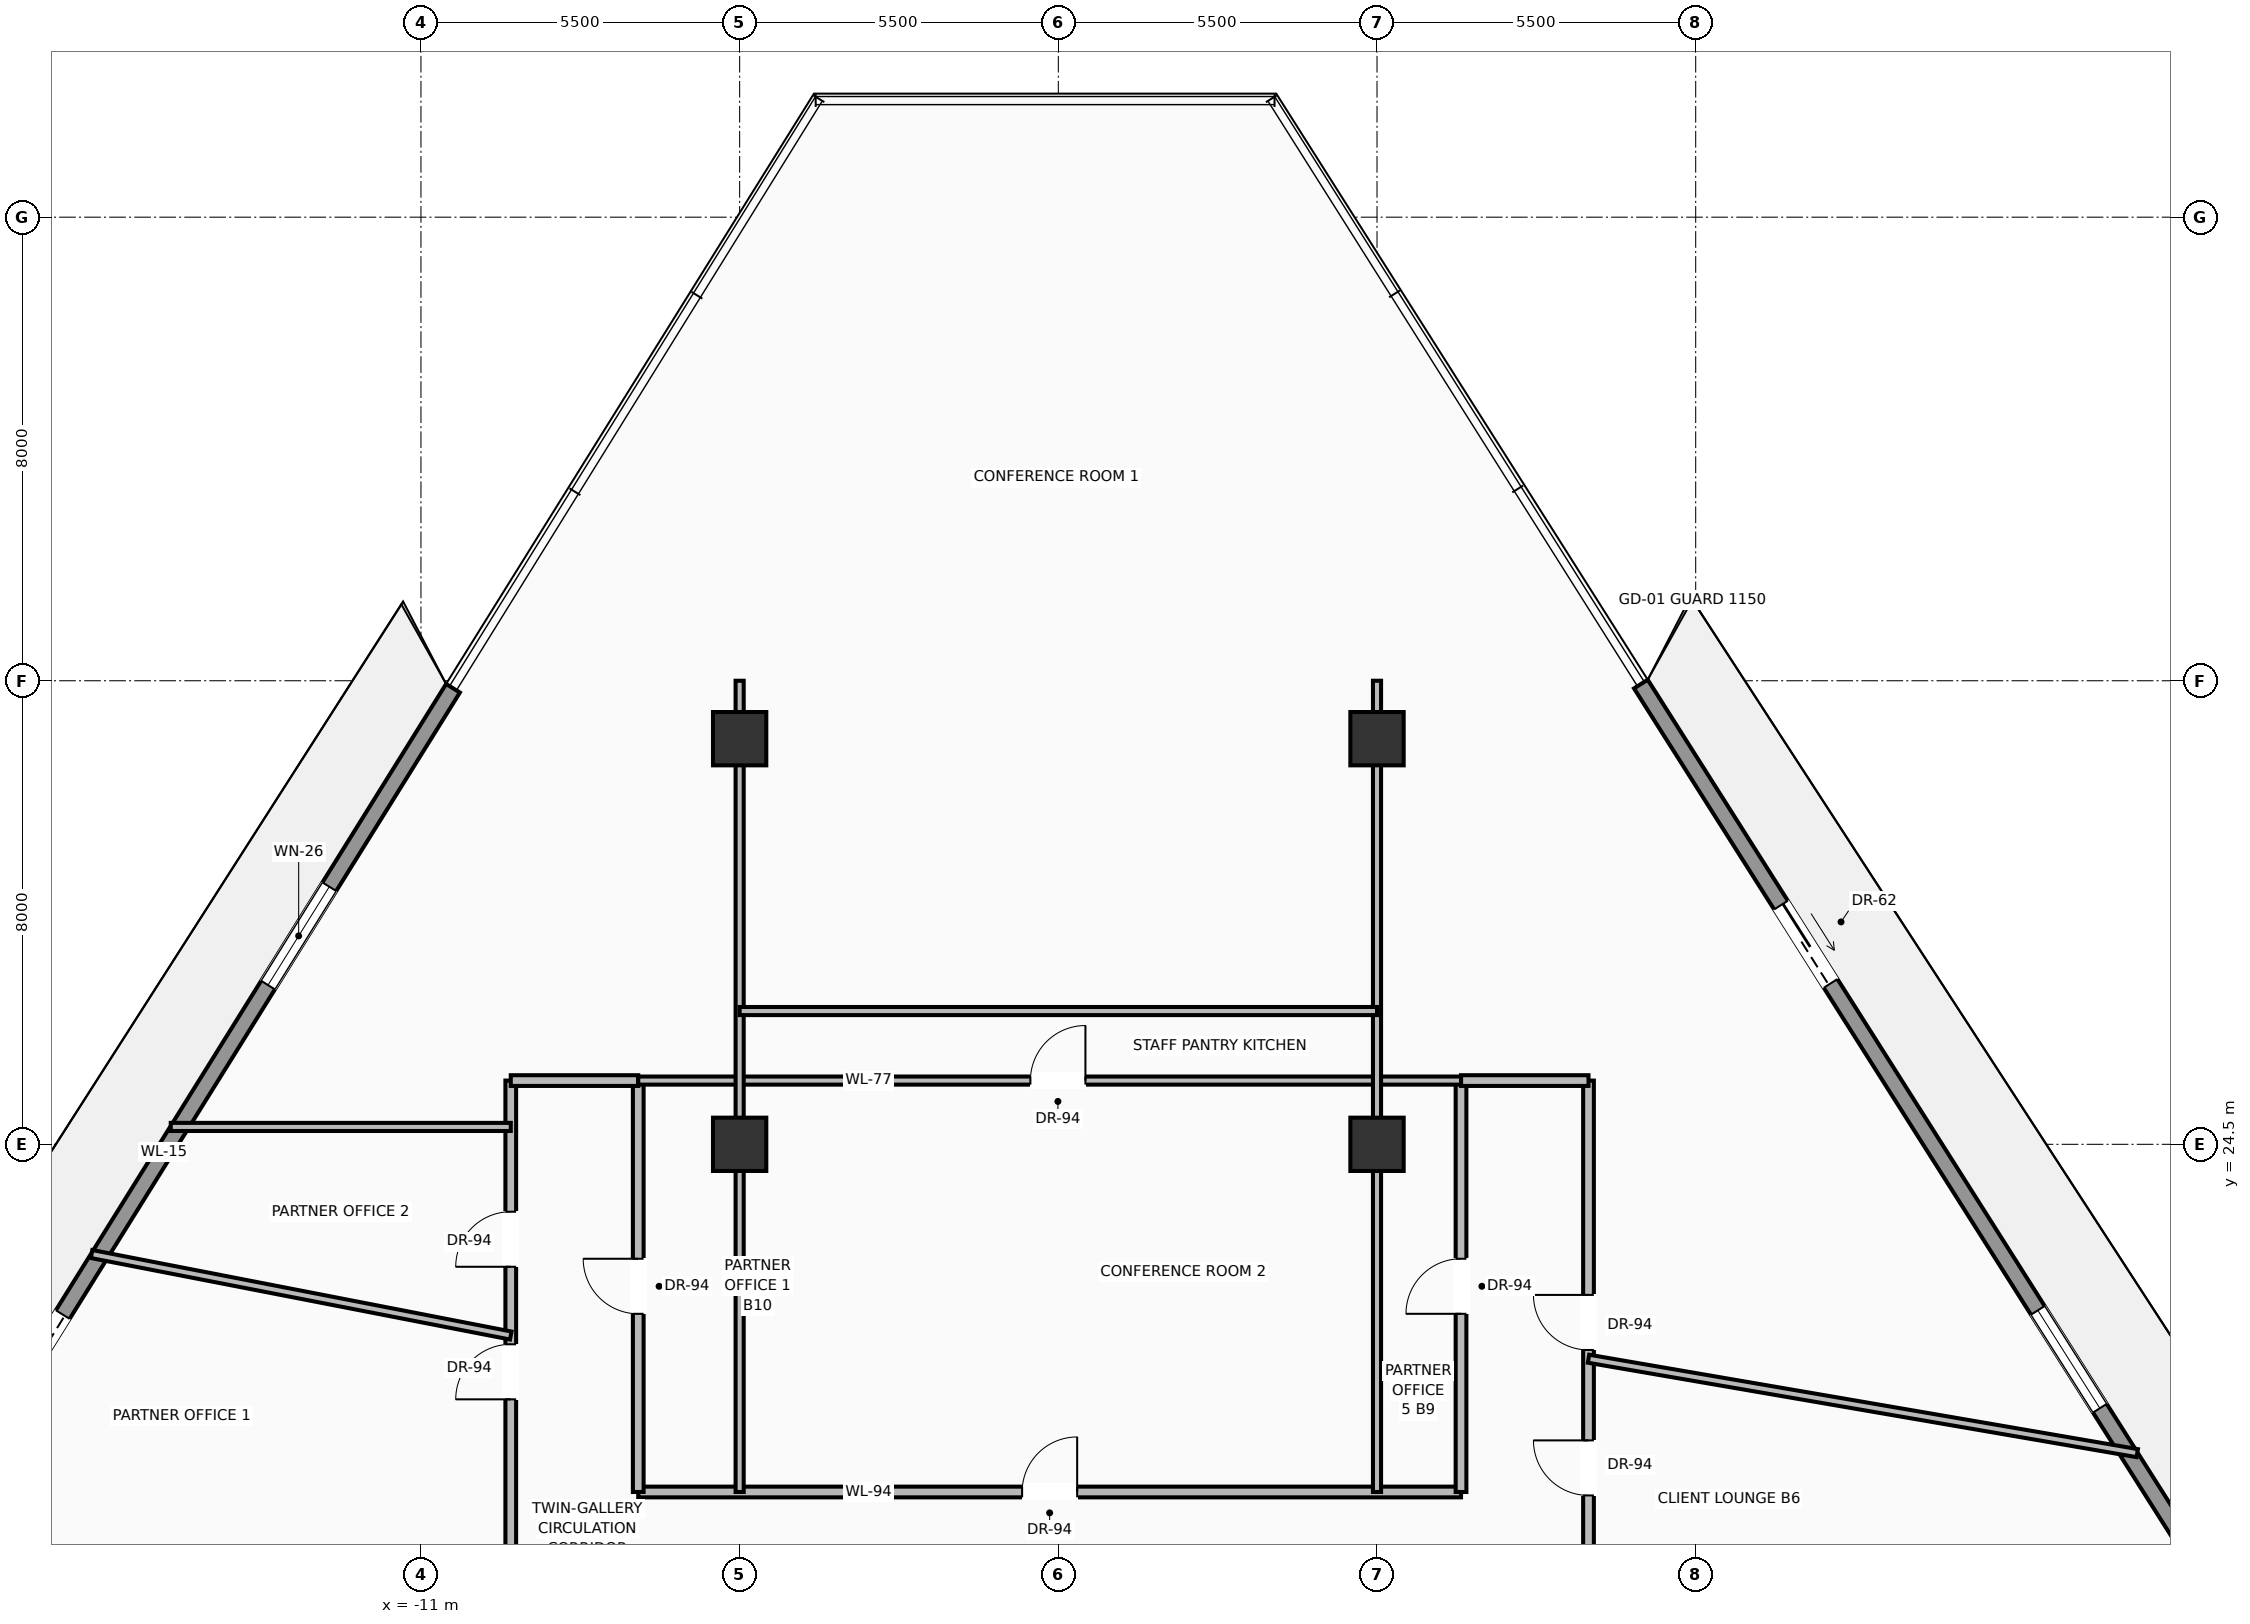
"""IFC4 building model, lengths in metres.
Left out: names, types, materials, properties, quantities, classifications, styles, units other than length and angle.
Written with IfcOpenShell. Run it as: python <this file> out.ifc"""

import sys

from ifc_helpers import new_model, si_unit, direction, frame, frame_2d, origin, origin_2d, place, context, subcontext, project, spatial, rectangle, extrude, source, transform, mapped, element, fill, save


model = new_model("IFC4")
c1 = context("Model", 3, precision=1e-05, world=origin(), true_north=direction((0.0, 1.0)))
c2 = subcontext(c1, "Body", "Model", "MODEL_VIEW")
j1 = project(units=[si_unit("LENGTHUNIT", "METRE"), si_unit("PLANEANGLEUNIT", "RADIAN")], contexts=[c1])
p1 = place(None, origin())
s1 = spatial("IfcSite", under=j1, at=p1, CompositionType="ELEMENT")
p2 = place(p1, origin())
s2 = spatial("IfcBuilding", under=s1, at=p2, CompositionType="ELEMENT")
p3 = place(p2, frame((0.0, 0.0, 182.1)))
s3 = spatial("IfcBuildingStorey", under=s2, at=p3, CompositionType="ELEMENT", Elevation=182.1)
m1 = source(origin(), c2, "Body", "SweptSolid", [
    extrude(rectangle(XDim=0.92, YDim=0.92, at=origin_2d()), origin(), (0.0, 0.0, 1.0), 3.7),
])
for number, where, z_axis, x_axis in (
    (1, (-5.5, 24.5, 0.0), (0.0, 0.0, 1.0), (1.0, 0.0, 0.0)),
    (2, (5.5, 24.5, 0.0), (0.0, 0.0, 1.0), (1.0, 0.0, 0.0)),
    (3, (-5.5, 31.5, 0.0), (0.0, 0.0, 1.0), (1.0, 0.0, 0.0)),
    (4, (5.5, 31.5, 0.0), (0.0, 0.0, 1.0), (1.0, 0.0, 0.0)),
):
    element("IfcColumn", number, at=place(p3, frame(where, z_axis=z_axis, x_axis=x_axis)), inside=s3, PredefinedType="COLUMN", context=c2, shape_type="MappedRepresentation", body=[
        mapped(m1, transform((0.0, 0.0, 0.0), scale=1.0)),
    ])
p4 = place(p3, frame((-20.423, 16.362, 0.0), z_axis=(0.0, 0.0, 1.0), x_axis=(0.528858297752, 0.848710139505, 0.0)))
e5 = element("IfcWall", 5, at=p4, inside=s3, PredefinedType="SOLIDWALL", context=c2, shape_type="SweptSolid", body=[
    extrude(rectangle(XDim=18.863, YDim=0.28, at=frame_2d((9.431, 0.0))), origin(), (0.0, 0.0, 1.0), 3.05),
])
p5 = place(p4, frame((4.527, 0.0, 0.0)))
e6 = element("IfcOpeningElement", 6, at=p5, cuts=e5, PredefinedType="OPENING", context=c2, shape_type="SweptSolid", body=[
    extrude(rectangle(XDim=1.6, YDim=2.35, at=frame_2d((0.8, 1.175))), frame((0.0, 0.15, 0.0), z_axis=(0.0, -1.0, 0.0), x_axis=(1.0, 0.0, 0.0)), (0.0, 0.0, 1.0), 0.3),
])
p6 = place(p4, frame((12.826, 0.0, 0.9)))
e7 = element("IfcOpeningElement", 7, at=p6, cuts=e5, PredefinedType="OPENING", context=c2, shape_type="SweptSolid", body=[
    extrude(rectangle(XDim=2.0, YDim=1.85, at=frame_2d((1.0, 0.925))), frame((0.0, 0.15, 0.0), z_axis=(0.0, -1.0, 0.0), x_axis=(1.0, 0.0, 0.0)), (0.0, 0.0, 1.0), 0.3),
])
p7 = place(p3, frame((10.054, 32.443, 0.0), z_axis=(0.0, 0.0, 1.0), x_axis=(0.535358537379, -0.844624908735, 0.0)))
e8 = element("IfcWall", 8, at=p7, inside=s3, PredefinedType="SOLIDWALL", context=c2, shape_type="SweptSolid", body=[
    extrude(rectangle(XDim=18.818, YDim=0.28, at=frame_2d((9.409, 0.0))), origin(), (0.0, 0.0, 1.0), 3.05),
])
p8 = place(p7, frame((4.516, 0.0, 0.0)))
e9 = element("IfcOpeningElement", 9, at=p8, cuts=e8, PredefinedType="OPENING", context=c2, shape_type="SweptSolid", body=[
    extrude(rectangle(XDim=1.6, YDim=2.35, at=frame_2d((0.8, 1.175))), frame((0.0, 0.15, 0.0), z_axis=(0.0, -1.0, 0.0), x_axis=(1.0, 0.0, 0.0)), (0.0, 0.0, 1.0), 0.3),
])
p9 = place(p7, frame((12.796, 0.0, 0.9)))
e10 = element("IfcOpeningElement", 10, at=p9, cuts=e8, PredefinedType="OPENING", context=c2, shape_type="SweptSolid", body=[
    extrude(rectangle(XDim=2.0, YDim=1.85, at=frame_2d((1.0, 0.925))), frame((0.0, 0.15, 0.0), z_axis=(0.0, -1.0, 0.0), x_axis=(1.0, 0.0, 0.0)), (0.0, 0.0, 1.0), 0.3),
])
p10 = place(p3, frame((-7.25, 18.5, 0.0), z_axis=(0.0, 0.0, 1.0), x_axis=(1.0, 0.0, 0.0)))
e11 = element("IfcWall", 11, at=p10, inside=s3, PredefinedType="PARTITIONING", context=c2, shape_type="SweptSolid", body=[
    extrude(rectangle(XDim=14.2, YDim=0.185, at=frame_2d((7.1, 0.0))), origin(), (0.0, 0.0, 1.0), 2.846),
])
p11 = place(p10, frame((6.625, 0.0, 0.0)))
e12 = element("IfcOpeningElement", 12, at=p11, cuts=e11, PredefinedType="OPENING", context=c2, shape_type="SweptSolid", body=[
    extrude(rectangle(XDim=0.95, YDim=2.2, at=frame_2d((0.475, 1.1))), frame((0.0, 0.103, 0.0), z_axis=(0.0, -1.0, 0.0), x_axis=(1.0, 0.0, 0.0)), (0.0, 0.0, 1.0), 0.205),
])
p12 = place(p3, frame((-7.25, 18.5, 0.0), z_axis=(0.0, 0.0, 1.0), x_axis=(0.0, 1.0, 0.0)))
e13 = element("IfcWall", 13, at=p12, inside=s3, PredefinedType="PARTITIONING", context=c2, shape_type="SweptSolid", body=[
    extrude(rectangle(XDim=7.1, YDim=0.185, at=frame_2d((3.55, 0.0))), origin(), (0.0, 0.0, 1.0), 2.846),
])
p13 = place(p12, frame((3.075, 0.0, 0.0)))
e14 = element("IfcOpeningElement", 14, at=p13, cuts=e13, PredefinedType="OPENING", context=c2, shape_type="SweptSolid", body=[
    extrude(rectangle(XDim=0.95, YDim=2.2, at=frame_2d((0.475, 1.1))), frame((0.0, 0.103, 0.0), z_axis=(0.0, -1.0, 0.0), x_axis=(1.0, 0.0, 0.0)), (0.0, 0.0, 1.0), 0.205),
])
p14 = place(p3, frame((6.95, 18.5, 0.0), z_axis=(0.0, 0.0, 1.0), x_axis=(0.0, 1.0, 0.0)))
e15 = element("IfcWall", 15, at=p14, inside=s3, PredefinedType="PARTITIONING", context=c2, shape_type="SweptSolid", body=[
    extrude(rectangle(XDim=7.1, YDim=0.185, at=frame_2d((3.55, 0.0))), origin(), (0.0, 0.0, 1.0), 2.846),
])
p15 = place(p14, frame((3.075, 0.0, 0.0)))
e16 = element("IfcOpeningElement", 16, at=p15, cuts=e15, PredefinedType="OPENING", context=c2, shape_type="SweptSolid", body=[
    extrude(rectangle(XDim=0.95, YDim=2.2, at=frame_2d((0.475, 1.1))), frame((0.0, 0.103, 0.0), z_axis=(0.0, -1.0, 0.0), x_axis=(1.0, 0.0, 0.0)), (0.0, 0.0, 1.0), 0.205),
])
p16 = place(p3, frame((-9.45, 16.4, 0.0), z_axis=(0.0, 0.0, 1.0), x_axis=(0.0, 1.0, 0.0)))
e17 = element("IfcWall", 17, at=p16, inside=s3, PredefinedType="PARTITIONING", context=c2, shape_type="SweptSolid", body=[
    extrude(rectangle(XDim=9.2, YDim=0.185, at=frame_2d((4.6, 0.0))), origin(), (0.0, 0.0, 1.0), 2.846),
])
p17 = place(p16, frame((3.699, 0.0, 0.0)))
e18 = element("IfcOpeningElement", 18, at=p17, cuts=e17, PredefinedType="OPENING", context=c2, shape_type="SweptSolid", body=[
    extrude(rectangle(XDim=0.95, YDim=2.2, at=frame_2d((0.475, 1.1))), frame((0.0, 0.103, 0.0), z_axis=(0.0, -1.0, 0.0), x_axis=(1.0, 0.0, 0.0)), (0.0, 0.0, 1.0), 0.205),
])
p18 = place(p16, frame((5.987, 0.0, 0.0)))
e19 = element("IfcOpeningElement", 19, at=p18, cuts=e17, PredefinedType="OPENING", context=c2, shape_type="SweptSolid", body=[
    extrude(rectangle(XDim=0.95, YDim=2.2, at=frame_2d((0.475, 1.1))), frame((0.0, 0.103, 0.0), z_axis=(0.0, -1.0, 0.0), x_axis=(1.0, 0.0, 0.0)), (0.0, 0.0, 1.0), 0.205),
])
p19 = place(p3, frame((9.15, 16.4, 0.0), z_axis=(0.0, 0.0, 1.0), x_axis=(0.0, 1.0, 0.0)))
e20 = element("IfcWall", 20, at=p19, inside=s3, PredefinedType="PARTITIONING", context=c2, shape_type="SweptSolid", body=[
    extrude(rectangle(XDim=9.2, YDim=0.185, at=frame_2d((4.6, 0.0))), origin(), (0.0, 0.0, 1.0), 2.846),
])
p20 = place(p19, frame((4.551, 0.0, 0.0)))
e21 = element("IfcOpeningElement", 21, at=p20, cuts=e20, PredefinedType="OPENING", context=c2, shape_type="SweptSolid", body=[
    extrude(rectangle(XDim=0.95, YDim=2.2, at=frame_2d((0.475, 1.1))), frame((0.0, 0.103, 0.0), z_axis=(0.0, -1.0, 0.0), x_axis=(1.0, 0.0, 0.0)), (0.0, 0.0, 1.0), 0.205),
])
p21 = place(p19, frame((2.041, 0.0, 0.0)))
e22 = element("IfcOpeningElement", 22, at=p21, cuts=e20, PredefinedType="OPENING", context=c2, shape_type="SweptSolid", body=[
    extrude(rectangle(XDim=0.95, YDim=2.2, at=frame_2d((0.475, 1.1))), frame((0.0, 0.103, 0.0), z_axis=(0.0, -1.0, 0.0), x_axis=(1.0, 0.0, 0.0)), (0.0, 0.0, 1.0), 0.205),
])
for number, where, z_axis, x_axis in (
    (23, (-9.45, 25.6, 0.0), (0.0, 0.0, 1.0), (1.0, 0.0, 0.0)),
    (24, (6.95, 25.6, 0.0), (0.0, 0.0, 1.0), (1.0, 0.0, 0.0)),
):
    element("IfcWall", number, at=place(p3, frame(where, z_axis=z_axis, x_axis=x_axis)), inside=s3, PredefinedType="PARTITIONING", context=c2, shape_type="SweptSolid", body=[
        extrude(rectangle(XDim=2.2, YDim=0.185, at=frame_2d((1.1, 0.0))), origin(), (0.0, 0.0, 1.0), 3.462),
    ])
p22 = place(p3, frame((-7.25, 25.6, 0.0), z_axis=(0.0, 0.0, 1.0), x_axis=(1.0, 0.0, 0.0)))
e25 = element("IfcWall", 25, at=p22, inside=s3, PredefinedType="PARTITIONING", context=c2, shape_type="SweptSolid", body=[
    extrude(rectangle(XDim=14.2, YDim=0.14, at=frame_2d((7.1, 0.0))), origin(), (0.0, 0.0, 1.0), 3.462),
])
p23 = place(p22, frame((6.768, 0.0, 0.0)))
e26 = element("IfcOpeningElement", 26, at=p23, cuts=e25, PredefinedType="OPENING", context=c2, shape_type="SweptSolid", body=[
    extrude(rectangle(XDim=0.95, YDim=2.2, at=frame_2d((0.475, 1.1))), frame((0.0, 0.08, 0.0), z_axis=(0.0, -1.0, 0.0), x_axis=(1.0, 0.0, 0.0)), (0.0, 0.0, 1.0), 0.16),
])
for number, where, z_axis, x_axis in (
    (27, (-5.5, 18.5, 0.0), (0.0, 0.0, 1.0), (0.0, 1.0, 0.0)),
    (28, (5.5, 18.5, 0.0), (0.0, 0.0, 1.0), (0.0, 1.0, 0.0)),
):
    element("IfcWall", number, at=place(p3, frame(where, z_axis=z_axis, x_axis=x_axis)), inside=s3, PredefinedType="PARTITIONING", context=c2, shape_type="SweptSolid", body=[
        extrude(rectangle(XDim=14.0, YDim=0.14, at=frame_2d((7.0, 0.0))), origin(), (0.0, 0.0, 1.0), 2.846),
    ])
p24 = place(p3, frame((-5.5, 26.8, 0.0), z_axis=(0.0, 0.0, 1.0), x_axis=(1.0, 0.0, 0.0)))
e29 = element("IfcWall", 29, at=p24, inside=s3, PredefinedType="PARTITIONING", context=c2, shape_type="SweptSolid", body=[
    extrude(rectangle(XDim=11.0, YDim=0.14, at=frame_2d((5.5, 0.0))), origin(), (0.0, 0.0, 1.0), 3.462),
])
p25 = place(p3, frame((-16.685, 22.607, 0.0), z_axis=(0.0, 0.0, 1.0), x_axis=(0.981615217267, -0.190870545739, 0.0)))
e30 = element("IfcWall", 30, at=p25, inside=s3, PredefinedType="PARTITIONING", context=c2, shape_type="SweptSolid", body=[
    extrude(rectangle(XDim=7.37, YDim=0.14, at=frame_2d((3.685, 0.0))), origin(), (0.0, 0.0, 1.0), 3.049),
])
p26 = place(p3, frame((-15.318, 24.8, 0.0), z_axis=(0.0, 0.0, 1.0), x_axis=(1.0, 0.0, 0.0)))
e31 = element("IfcWall", 31, at=p26, inside=s3, PredefinedType="PARTITIONING", context=c2, shape_type="SweptSolid", body=[
    extrude(rectangle(XDim=5.868, YDim=0.14, at=frame_2d((2.934, 0.0))), origin(), (0.0, 0.0, 1.0), 3.462),
])
p27 = place(p3, frame((9.15, 20.8, 0.0), z_axis=(0.0, 0.0, 1.0), x_axis=(0.985515802889, -0.169583614351, 0.0)))
e32 = element("IfcWall", 32, at=p27, inside=s3, PredefinedType="PARTITIONING", context=c2, shape_type="SweptSolid", body=[
    extrude(rectangle(XDim=9.61, YDim=0.14, at=frame_2d((4.805, 0.0))), origin(), (0.0, 0.0, 1.0), 3.049),
])
m2 = source(origin(), c2, "Body", "SweptSolid", [
    extrude(rectangle(XDim=1.6, YDim=2.35, at=frame_2d((0.8, 1.175))), frame((0.0, 0.025, 0.0), z_axis=(0.0, -1.0, 0.0), x_axis=(1.0, 0.0, 0.0)), (0.0, 0.0, 1.0), 0.05),
])
p28 = place(p5, origin())
e33 = element("IfcDoor", 33, at=p28, inside=s3, OperationType="SLIDING_TO_LEFT", PredefinedType="DOOR", context=c2, shape_type="MappedRepresentation", body=[
    mapped(m2, transform((0.0, 0.0, 0.0), scale=1.0)),
])
fill(e6, e33)
m3 = source(origin(), c2, "Body", "SweptSolid", [
    extrude(rectangle(XDim=2.0, YDim=1.85, at=frame_2d((1.0, 0.925))), frame((0.0, 0.03, 0.0), z_axis=(0.0, -1.0, 0.0), x_axis=(1.0, 0.0, 0.0)), (0.0, 0.0, 1.0), 0.06),
])
p29 = place(p6, origin())
e34 = element("IfcWindow", 34, at=p29, inside=s3, PartitioningType="SINGLE_PANEL", PredefinedType="WINDOW", context=c2, shape_type="MappedRepresentation", body=[
    mapped(m3, transform((0.0, 0.0, 0.0), scale=1.0)),
])
fill(e7, e34)
p30 = place(p8, origin())
e35 = element("IfcDoor", 35, at=p30, inside=s3, OperationType="SLIDING_TO_RIGHT", PredefinedType="DOOR", context=c2, shape_type="MappedRepresentation", body=[
    mapped(m2, transform((0.0, 0.0, 0.0), scale=1.0)),
])
fill(e9, e35)
p31 = place(p9, origin())
e36 = element("IfcWindow", 36, at=p31, inside=s3, PartitioningType="SINGLE_PANEL", PredefinedType="WINDOW", context=c2, shape_type="MappedRepresentation", body=[
    mapped(m3, transform((0.0, 0.0, 0.0), scale=1.0)),
])
fill(e10, e36)
m4 = source(origin(), c2, "Body", "SweptSolid", [
    extrude(rectangle(XDim=0.95, YDim=2.2, at=frame_2d((0.475, 1.1))), frame((0.0, 0.025, 0.0), z_axis=(0.0, -1.0, 0.0), x_axis=(1.0, 0.0, 0.0)), (0.0, 0.0, 1.0), 0.05),
])
p32 = place(p11, origin())
e37 = element("IfcDoor", 37, at=p32, inside=s3, OperationType="SINGLE_SWING_RIGHT", PredefinedType="DOOR", context=c2, shape_type="MappedRepresentation", body=[
    mapped(m4, transform((0.0, 0.0, 0.0), scale=1.0)),
])
fill(e12, e37)
p33 = place(p17, origin())
e38 = element("IfcDoor", 38, at=p33, inside=s3, OperationType="SINGLE_SWING_LEFT", PredefinedType="DOOR", context=c2, shape_type="MappedRepresentation", body=[
    mapped(m4, transform((0.0, 0.0, 0.0), scale=1.0)),
])
fill(e18, e38)
p34 = place(p20, origin())
e39 = element("IfcDoor", 39, at=p34, inside=s3, OperationType="SINGLE_SWING_RIGHT", PredefinedType="DOOR", context=c2, shape_type="MappedRepresentation", body=[
    mapped(m4, transform((0.0, 0.0, 0.0), scale=1.0)),
])
fill(e21, e39)
p35 = place(p21, origin())
e40 = element("IfcDoor", 40, at=p35, inside=s3, OperationType="SINGLE_SWING_RIGHT", PredefinedType="DOOR", context=c2, shape_type="MappedRepresentation", body=[
    mapped(m4, transform((0.0, 0.0, 0.0), scale=1.0)),
])
fill(e22, e40)
p36 = place(p15, origin())
e41 = element("IfcDoor", 41, at=p36, inside=s3, OperationType="SINGLE_SWING_LEFT", PredefinedType="DOOR", context=c2, shape_type="MappedRepresentation", body=[
    mapped(m4, transform((0.0, 0.0, 0.0), scale=1.0)),
])
fill(e16, e41)
p37 = place(p13, origin())
e42 = element("IfcDoor", 42, at=p37, inside=s3, OperationType="SINGLE_SWING_RIGHT", PredefinedType="DOOR", context=c2, shape_type="MappedRepresentation", body=[
    mapped(m4, transform((0.0, 0.0, 0.0), scale=1.0)),
])
fill(e14, e42)
p38 = place(p18, origin())
e43 = element("IfcDoor", 43, at=p38, inside=s3, OperationType="SINGLE_SWING_LEFT", PredefinedType="DOOR", context=c2, shape_type="MappedRepresentation", body=[
    mapped(m4, transform((0.0, 0.0, 0.0), scale=1.0)),
])
fill(e19, e43)
p39 = place(p23, origin())
e44 = element("IfcDoor", 44, at=p39, inside=s3, OperationType="SINGLE_SWING_RIGHT", PredefinedType="DOOR", context=c2, shape_type="MappedRepresentation", body=[
    mapped(m4, transform((0.0, 0.0, 0.0), scale=1.0)),
])
fill(e26, e44)
save(model, sys.argv[1])
